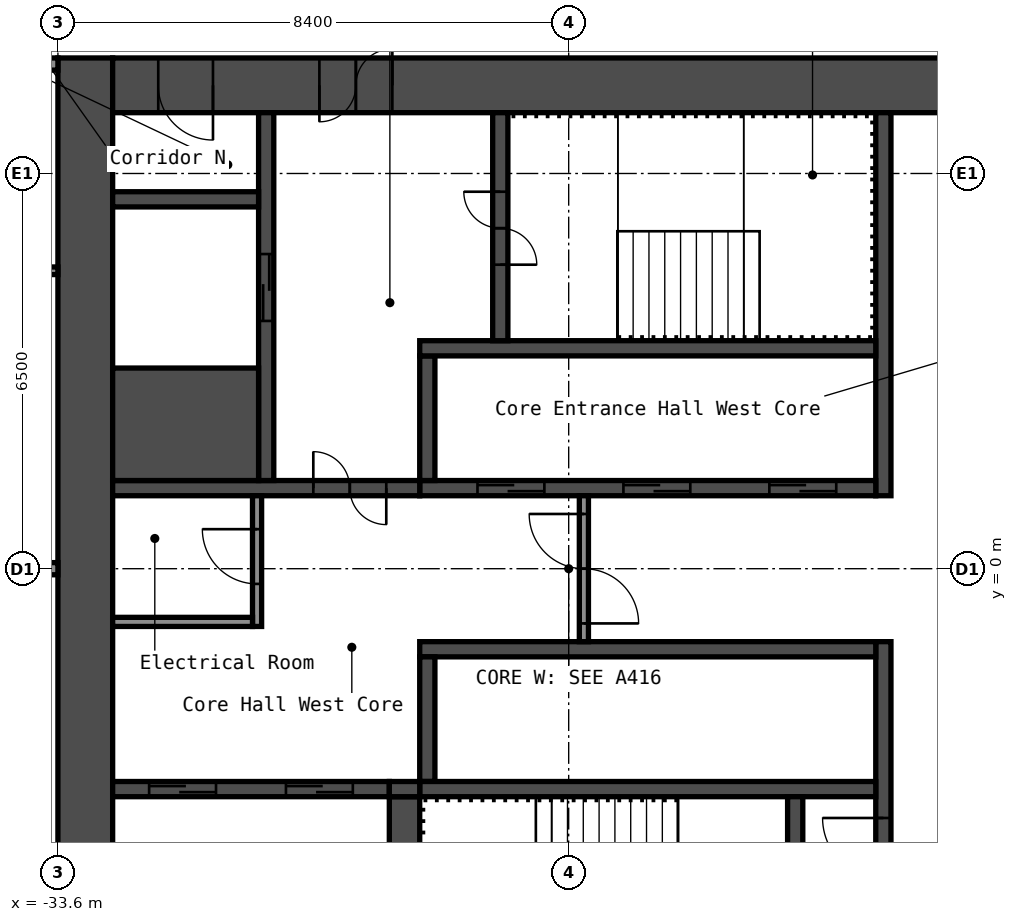
"""IFC4 building model, lengths in metres.
Left out: names, types, materials, properties, quantities, classifications, styles, units other than length and angle.
Written with IfcOpenShell. Run it as: python <this file> out.ifc"""

import sys

from ifc_helpers import new_model, si_unit, direction, frame, frame_2d, origin, place, context, subcontext, project, spatial, rectangle, extrude, element, fill, save


model = new_model("IFC4")
c1 = context("Model", 3, precision=1e-05, world=origin(), true_north=direction((0.0, 1.0)))
c2 = subcontext(c1, "Body", "Model", "MODEL_VIEW")
j1 = project(units=[si_unit("LENGTHUNIT", "METRE"), si_unit("PLANEANGLEUNIT", "RADIAN")], contexts=[c1])
p1 = place(None, origin())
s1 = spatial("IfcSite", under=j1, at=p1, CompositionType="ELEMENT")
p2 = place(p1, origin())
s2 = spatial("IfcBuilding", under=s1, at=p2, CompositionType="ELEMENT")
p3 = place(p2, frame((0.0, 0.0, 110.6)))
s3 = spatial("IfcBuildingStorey", under=s2, at=p3, CompositionType="ELEMENT", Elevation=110.6)
p4 = place(p3, frame((-33.15, -8.4, 0.0), z_axis=(0.0, 0.0, 1.0), x_axis=(0.0, 1.0, 0.0)))
e1 = element("IfcWall", 1, at=p4, inside=s3, PredefinedType="SHEAR", context=c2, shape_type="SweptSolid", body=[
    extrude(rectangle(XDim=16.8, YDim=0.9, at=frame_2d((8.4, 0.0))), origin(), (0.0, 0.0, 1.0), 2.8),
])
p5 = place(p3, frame((-32.7, 7.95, 0.0), z_axis=(0.0, 0.0, 1.0), x_axis=(1.0, 0.0, 0.0)))
e2 = element("IfcWall", 2, at=p5, inside=s3, PredefinedType="SHEAR", context=c2, shape_type="SweptSolid", body=[
    extrude(rectangle(XDim=15.0, YDim=0.9, at=frame_2d((7.5, 0.0))), origin(), (0.0, 0.0, 1.0), 2.8),
])
p6 = place(p5, frame((3.4, 0.0, 0.0)))
e3 = element("IfcOpeningElement", 3, at=p6, cuts=e2, PredefinedType="OPENING", context=c2, shape_type="SweptSolid", body=[
    extrude(rectangle(XDim=1.2, YDim=2.1, at=frame_2d((0.6, 1.05))), frame((0.0, 0.46, 0.0), z_axis=(0.0, -1.0, 0.0), x_axis=(1.0, 0.0, 0.0)), (0.0, 0.0, 1.0), 0.92),
])
p7 = place(p5, frame((0.75, 0.0, 0.0)))
e4 = element("IfcOpeningElement", 4, at=p7, cuts=e2, PredefinedType="OPENING", context=c2, shape_type="SweptSolid", body=[
    extrude(rectangle(XDim=0.9, YDim=2.1, at=frame_2d((0.45, 1.05))), frame((0.0, 0.46, 0.0), z_axis=(0.0, -1.0, 0.0), x_axis=(1.0, 0.0, 0.0)), (0.0, 0.0, 1.0), 0.92),
])
p8 = place(p3, frame((-20.025, 1.2, 0.0), z_axis=(0.0, 0.0, 1.0), x_axis=(0.0, 1.0, 0.0)))
e5 = element("IfcWall", 5, at=p8, inside=s3, PredefinedType="SHEAR", context=c2, shape_type="SweptSolid", body=[
    extrude(rectangle(XDim=6.3, YDim=0.25, at=frame_2d((3.15, 0.0))), origin(), (0.0, 0.0, 1.0), 2.8),
])
p9 = place(p3, frame((-20.025, -7.5, 0.0), z_axis=(0.0, 0.0, 1.0), x_axis=(0.0, 1.0, 0.0)))
e6 = element("IfcWall", 6, at=p9, inside=s3, PredefinedType="SHEAR", context=c2, shape_type="SweptSolid", body=[
    extrude(rectangle(XDim=6.3, YDim=0.25, at=frame_2d((3.15, 0.0))), origin(), (0.0, 0.0, 1.0), 2.8),
])
p10 = place(p9, frame((2.4, 0.0, 0.0)))
e7 = element("IfcOpeningElement", 7, at=p10, cuts=e6, PredefinedType="OPENING", context=c2, shape_type="SweptSolid", body=[
    extrude(rectangle(XDim=1.0, YDim=2.1, at=frame_2d((0.5, 1.05))), frame((0.0, 0.135, 0.0), z_axis=(0.0, -1.0, 0.0), x_axis=(1.0, 0.0, 0.0)), (0.0, 0.0, 1.0), 0.27),
])
p11 = place(p3, frame((-27.65, 1.325, 0.0), z_axis=(0.0, 0.0, 1.0), x_axis=(1.0, 0.0, 0.0)))
e8 = element("IfcWall", 8, at=p11, inside=s3, PredefinedType="SHEAR", context=c2, shape_type="SweptSolid", body=[
    extrude(rectangle(XDim=7.5, YDim=0.25, at=frame_2d((3.75, 0.0))), origin(), (0.0, 0.0, 1.0), 2.8),
])
p12 = place(p11, frame((5.75, 0.0, 0.0)))
e9 = element("IfcOpeningElement", 9, at=p12, cuts=e8, PredefinedType="OPENING", context=c2, shape_type="SweptSolid", body=[
    extrude(rectangle(XDim=1.1, YDim=2.1, at=frame_2d((0.55, 1.05))), frame((0.0, 0.135, 0.0), z_axis=(0.0, -1.0, 0.0), x_axis=(1.0, 0.0, 0.0)), (0.0, 0.0, 1.0), 0.27),
])
p13 = place(p11, frame((3.35, 0.0, 0.0)))
e10 = element("IfcOpeningElement", 10, at=p13, cuts=e8, PredefinedType="OPENING", context=c2, shape_type="SweptSolid", body=[
    extrude(rectangle(XDim=1.1, YDim=2.1, at=frame_2d((0.55, 1.05))), frame((0.0, 0.135, 0.0), z_axis=(0.0, -1.0, 0.0), x_axis=(1.0, 0.0, 0.0)), (0.0, 0.0, 1.0), 0.27),
])
p14 = place(p11, frame((0.95, 0.0, 0.0)))
e11 = element("IfcOpeningElement", 11, at=p14, cuts=e8, PredefinedType="OPENING", context=c2, shape_type="SweptSolid", body=[
    extrude(rectangle(XDim=1.1, YDim=2.1, at=frame_2d((0.55, 1.05))), frame((0.0, 0.135, 0.0), z_axis=(0.0, -1.0, 0.0), x_axis=(1.0, 0.0, 0.0)), (0.0, 0.0, 1.0), 0.27),
])
p15 = place(p3, frame((-27.525, 1.45, 0.0), z_axis=(0.0, 0.0, 1.0), x_axis=(0.0, 1.0, 0.0)))
e12 = element("IfcWall", 12, at=p15, inside=s3, PredefinedType="SHEAR", context=c2, shape_type="SweptSolid", body=[
    extrude(rectangle(XDim=2.05, YDim=0.25, at=frame_2d((1.025, 0.0))), origin(), (0.0, 0.0, 1.0), 2.8),
])
p16 = place(p3, frame((-27.65, 3.625, 0.0), z_axis=(0.0, 0.0, 1.0), x_axis=(1.0, 0.0, 0.0)))
e13 = element("IfcWall", 13, at=p16, inside=s3, PredefinedType="SHEAR", context=c2, shape_type="SweptSolid", body=[
    extrude(rectangle(XDim=7.5, YDim=0.25, at=frame_2d((3.75, 0.0))), origin(), (0.0, 0.0, 1.0), 2.8),
])
p17 = place(p3, frame((-26.325, 3.75, 0.0), z_axis=(0.0, 0.0, 1.0), x_axis=(0.0, 1.0, 0.0)))
e14 = element("IfcWall", 14, at=p17, inside=s3, PredefinedType="SHEAR", context=c2, shape_type="SweptSolid", body=[
    extrude(rectangle(XDim=3.75, YDim=0.25, at=frame_2d((1.875, 0.0))), origin(), (0.0, 0.0, 1.0), 2.8),
])
p18 = place(p17, frame((1.25, 0.0, 0.0)))
e15 = element("IfcOpeningElement", 15, at=p18, cuts=e14, PredefinedType="OPENING", context=c2, shape_type="SweptSolid", body=[
    extrude(rectangle(XDim=1.2, YDim=2.1, at=frame_2d((0.6, 1.05))), frame((0.0, 0.135, 0.0), z_axis=(0.0, -1.0, 0.0), x_axis=(1.0, 0.0, 0.0)), (0.0, 0.0, 1.0), 0.27),
])
p19 = place(p3, frame((-32.7, 1.325, 0.0), z_axis=(0.0, 0.0, 1.0), x_axis=(1.0, 0.0, 0.0)))
e16 = element("IfcWall", 16, at=p19, inside=s3, PredefinedType="SHEAR", context=c2, shape_type="SweptSolid", body=[
    extrude(rectangle(XDim=5.05, YDim=0.25, at=frame_2d((2.525, 0.0))), origin(), (0.0, 0.0, 1.0), 2.8),
])
p20 = place(p19, frame((3.3, 0.0, 0.0)))
e17 = element("IfcOpeningElement", 17, at=p20, cuts=e16, PredefinedType="OPENING", context=c2, shape_type="SweptSolid", body=[
    extrude(rectangle(XDim=1.2, YDim=2.1, at=frame_2d((0.6, 1.05))), frame((0.0, 0.135, 0.0), z_axis=(0.0, -1.0, 0.0), x_axis=(1.0, 0.0, 0.0)), (0.0, 0.0, 1.0), 0.27),
])
p21 = place(p3, frame((-30.175, 1.45, 0.0), z_axis=(0.0, 0.0, 1.0), x_axis=(0.0, 1.0, 0.0)))
e18 = element("IfcWall", 18, at=p21, inside=s3, PredefinedType="SHEAR", context=c2, shape_type="SweptSolid", body=[
    extrude(rectangle(XDim=6.05, YDim=0.25, at=frame_2d((3.025, 0.0))), origin(), (0.0, 0.0, 1.0), 2.8),
])
p22 = place(p21, frame((2.625, 0.0, 0.0)))
e19 = element("IfcOpeningElement", 19, at=p22, cuts=e18, PredefinedType="OPENING", context=c2, shape_type="SweptSolid", body=[
    extrude(rectangle(XDim=1.1, YDim=2.1, at=frame_2d((0.55, 1.05))), frame((0.0, 0.135, 0.0), z_axis=(0.0, -1.0, 0.0), x_axis=(1.0, 0.0, 0.0)), (0.0, 0.0, 1.0), 0.27),
])
p23 = place(p3, frame((-32.7, 2.375, 0.0), z_axis=(0.0, 0.0, 1.0), x_axis=(1.0, 0.0, 0.0)))
e20 = element("IfcWall", 20, at=p23, inside=s3, PredefinedType="SHEAR", context=c2, shape_type="SweptSolid", body=[
    extrude(rectangle(XDim=2.4, YDim=1.85, at=frame_2d((1.2, 0.0))), origin(), (0.0, 0.0, 1.0), 2.8),
])
p24 = place(p3, frame((-32.7, 6.075, 0.0), z_axis=(0.0, 0.0, 1.0), x_axis=(1.0, 0.0, 0.0)))
e21 = element("IfcWall", 21, at=p24, inside=s3, PredefinedType="SHEAR", context=c2, shape_type="SweptSolid", body=[
    extrude(rectangle(XDim=2.4, YDim=0.25, at=frame_2d((1.2, 0.0))), origin(), (0.0, 0.0, 1.0), 2.8),
])
p25 = place(p3, frame((-27.65, -1.325, 0.0), z_axis=(0.0, 0.0, 1.0), x_axis=(1.0, 0.0, 0.0)))
e22 = element("IfcWall", 22, at=p25, inside=s3, PredefinedType="SHEAR", context=c2, shape_type="SweptSolid", body=[
    extrude(rectangle(XDim=7.5, YDim=0.25, at=frame_2d((3.75, 0.0))), origin(), (0.0, 0.0, 1.0), 2.8),
])
p26 = place(p3, frame((-27.525, -3.5, 0.0), z_axis=(0.0, 0.0, 1.0), x_axis=(0.0, 1.0, 0.0)))
e23 = element("IfcWall", 23, at=p26, inside=s3, PredefinedType="SHEAR", context=c2, shape_type="SweptSolid", body=[
    extrude(rectangle(XDim=2.05, YDim=0.25, at=frame_2d((1.025, 0.0))), origin(), (0.0, 0.0, 1.0), 2.8),
])
p27 = place(p3, frame((-27.65, -3.625, 0.0), z_axis=(0.0, 0.0, 1.0), x_axis=(1.0, 0.0, 0.0)))
e24 = element("IfcWall", 24, at=p27, inside=s3, PredefinedType="SHEAR", context=c2, shape_type="SweptSolid", body=[
    extrude(rectangle(XDim=7.5, YDim=0.25, at=frame_2d((3.75, 0.0))), origin(), (0.0, 0.0, 1.0), 2.8),
])
p28 = place(p3, frame((-21.475, -7.5, 0.0), z_axis=(0.0, 0.0, 1.0), x_axis=(0.0, 1.0, 0.0)))
e25 = element("IfcWall", 25, at=p28, inside=s3, PredefinedType="SHEAR", context=c2, shape_type="SweptSolid", body=[
    extrude(rectangle(XDim=3.75, YDim=0.25, at=frame_2d((1.875, 0.0))), origin(), (0.0, 0.0, 1.0), 2.8),
])
p29 = place(p28, frame((1.3, 0.0, 0.0)))
e26 = element("IfcOpeningElement", 26, at=p29, cuts=e25, PredefinedType="OPENING", context=c2, shape_type="SweptSolid", body=[
    extrude(rectangle(XDim=1.2, YDim=2.1, at=frame_2d((0.6, 1.05))), frame((0.0, 0.135, 0.0), z_axis=(0.0, -1.0, 0.0), x_axis=(1.0, 0.0, 0.0)), (0.0, 0.0, 1.0), 0.27),
])
p30 = place(p3, frame((-27.9, -7.5, 0.0), z_axis=(0.0, 0.0, 1.0), x_axis=(0.0, 1.0, 0.0)))
e27 = element("IfcWall", 27, at=p30, inside=s3, PredefinedType="SHEAR", context=c2, shape_type="SweptSolid", body=[
    extrude(rectangle(XDim=3.75, YDim=0.5, at=frame_2d((1.875, 0.0))), origin(), (0.0, 0.0, 1.0), 2.8),
])
p31 = place(p3, frame((-32.7, -3.625, 0.0), z_axis=(0.0, 0.0, 1.0), x_axis=(1.0, 0.0, 0.0)))
e28 = element("IfcWall", 28, at=p31, inside=s3, PredefinedType="SHEAR", context=c2, shape_type="SweptSolid", body=[
    extrude(rectangle(XDim=4.55, YDim=0.25, at=frame_2d((2.275, 0.0))), origin(), (0.0, 0.0, 1.0), 2.8),
])
p32 = place(p31, frame((2.85, 0.0, 0.0)))
e29 = element("IfcOpeningElement", 29, at=p32, cuts=e28, PredefinedType="OPENING", context=c2, shape_type="SweptSolid", body=[
    extrude(rectangle(XDim=1.1, YDim=2.1, at=frame_2d((0.55, 1.05))), frame((0.0, 0.135, 0.0), z_axis=(0.0, -1.0, 0.0), x_axis=(1.0, 0.0, 0.0)), (0.0, 0.0, 1.0), 0.27),
])
p33 = place(p31, frame((0.6, 0.0, 0.0)))
e30 = element("IfcOpeningElement", 30, at=p33, cuts=e28, PredefinedType="OPENING", context=c2, shape_type="SweptSolid", body=[
    extrude(rectangle(XDim=1.1, YDim=2.1, at=frame_2d((0.55, 1.05))), frame((0.0, 0.135, 0.0), z_axis=(0.0, -1.0, 0.0), x_axis=(1.0, 0.0, 0.0)), (0.0, 0.0, 1.0), 0.27),
])
p34 = place(p3, frame((-28.15, -3.625, 0.0), z_axis=(0.0, 0.0, 1.0), x_axis=(1.0, 0.0, 0.0)))
e31 = element("IfcWall", 31, at=p34, inside=s3, PredefinedType="SHEAR", context=c2, shape_type="SweptSolid", body=[
    extrude(rectangle(XDim=0.5, YDim=0.25, at=frame_2d((0.25, 0.0))), origin(), (0.0, 0.0, 1.0), 2.8),
])
p35 = place(p3, frame((-24.95, -1.2, 0.0), z_axis=(0.0, 0.0, 1.0), x_axis=(0.0, 1.0, 0.0)))
e32 = element("IfcWall", 32, at=p35, inside=s3, PredefinedType="PARTITIONING", context=c2, shape_type="SweptSolid", body=[
    extrude(rectangle(XDim=2.4, YDim=0.15, at=frame_2d((1.2, 0.0))), origin(), (0.0, 0.0, 1.0), 2.8),
])
p36 = place(p35, frame((0.3, 0.0, 0.0)))
e33 = element("IfcOpeningElement", 33, at=p36, cuts=e32, PredefinedType="OPENING", context=c2, shape_type="SweptSolid", body=[
    extrude(rectangle(XDim=1.8, YDim=2.1, at=frame_2d((0.9, 1.05))), frame((0.0, 0.085, 0.0), z_axis=(0.0, -1.0, 0.0), x_axis=(1.0, 0.0, 0.0)), (0.0, 0.0, 1.0), 0.17),
])
p37 = place(p3, frame((-30.325, -0.95, 0.0), z_axis=(0.0, 0.0, 1.0), x_axis=(0.0, 1.0, 0.0)))
e34 = element("IfcWall", 34, at=p37, inside=s3, PredefinedType="PARTITIONING", context=c2, shape_type="SweptSolid", body=[
    extrude(rectangle(XDim=2.15, YDim=0.15, at=frame_2d((1.075, 0.0))), origin(), (0.0, 0.0, 1.0), 2.8),
])
p38 = place(p37, frame((0.7, 0.0, 0.0)))
e35 = element("IfcOpeningElement", 35, at=p38, cuts=e34, PredefinedType="OPENING", context=c2, shape_type="SweptSolid", body=[
    extrude(rectangle(XDim=0.9, YDim=2.1, at=frame_2d((0.45, 1.05))), frame((0.0, 0.085, 0.0), z_axis=(0.0, -1.0, 0.0), x_axis=(1.0, 0.0, 0.0)), (0.0, 0.0, 1.0), 0.17),
])
p39 = place(p3, frame((-32.7, -0.875, 0.0), z_axis=(0.0, 0.0, 1.0), x_axis=(1.0, 0.0, 0.0)))
e36 = element("IfcWall", 36, at=p39, inside=s3, PredefinedType="PARTITIONING", context=c2, shape_type="SweptSolid", body=[
    extrude(rectangle(XDim=2.3, YDim=0.15, at=frame_2d((1.15, 0.0))), origin(), (0.0, 0.0, 1.0), 2.8),
])
p40 = place(p3, frame((-43.9, 0.0, 0.0), z_axis=(0.0, 0.0, 1.0), x_axis=(1.0, 0.0, 0.0)))
e37 = element("IfcWall", 37, at=p40, inside=s3, PredefinedType="PARTITIONING", context=c2, shape_type="SweptSolid", body=[
    extrude(rectangle(XDim=10.3, YDim=0.2, at=frame_2d((5.15, 0.0))), origin(), (0.0, 0.0, 1.0), 2.8),
])
p41 = place(p3, frame((-36.938, 4.9, 0.0), z_axis=(0.0, 0.0, 1.0), x_axis=(1.0, 0.0, 0.0)))
e38 = element("IfcWall", 38, at=p41, inside=s3, PredefinedType="PARTITIONING", context=c2, shape_type="SweptSolid", body=[
    extrude(rectangle(XDim=3.337, YDim=0.125, at=frame_2d((1.669, 0.0))), origin(), (0.0, 0.0, 1.0), 2.8),
])
p42 = place(p41, frame((1.238, 0.0, 0.0)))
e39 = element("IfcOpeningElement", 39, at=p42, cuts=e38, PredefinedType="OPENING", context=c2, shape_type="SweptSolid", body=[
    extrude(rectangle(XDim=0.8, YDim=2.1, at=frame_2d((0.4, 1.05))), frame((0.0, 0.073, 0.0), z_axis=(0.0, -1.0, 0.0), x_axis=(1.0, 0.0, 0.0)), (0.0, 0.0, 1.0), 0.145),
])
p43 = place(p3, frame((-44.0, 8.3, 0.0), z_axis=(0.0, 0.0, 1.0), x_axis=(1.0, 0.0, 0.0)))
e40 = element("IfcWall", 40, at=p43, inside=s3, PredefinedType="PARTITIONING", context=c2, shape_type="SweptSolid", body=[
    extrude(rectangle(XDim=10.4, YDim=0.2, at=frame_2d((5.2, 0.0))), origin(), (0.0, 0.0, 1.0), 2.8),
])
p44 = place(p43, frame((3.05, 0.0, 0.0)))
e41 = element("IfcOpeningElement", 41, at=p44, cuts=e40, PredefinedType="OPENING", context=c2, shape_type="SweptSolid", body=[
    extrude(rectangle(XDim=1.0, YDim=2.1, at=frame_2d((0.5, 1.05))), frame((0.0, 0.11, 0.0), z_axis=(0.0, -1.0, 0.0), x_axis=(1.0, 0.0, 0.0)), (0.0, 0.0, 1.0), 0.22),
])
p45 = place(p6, origin())
e42 = element("IfcDoor", 42, at=p45, inside=s3, OperationType="DOUBLE_DOOR_SINGLE_SWING", PredefinedType="DOOR", context=c2, shape_type="SweptSolid", body=[
    extrude(rectangle(XDim=1.2, YDim=2.1, at=frame_2d((0.6, 1.05))), frame((0.0, 0.025, 0.0), z_axis=(0.0, -1.0, 0.0), x_axis=(1.0, 0.0, 0.0)), (0.0, 0.0, 1.0), 0.05),
])
fill(e3, e42)
p46 = place(p7, origin())
e43 = element("IfcDoor", 43, at=p46, inside=s3, OperationType="SINGLE_SWING_RIGHT", PredefinedType="DOOR", context=c2, shape_type="SweptSolid", body=[
    extrude(rectangle(XDim=0.9, YDim=2.1, at=frame_2d((0.45, 1.05))), frame((0.0, 0.025, 0.0), z_axis=(0.0, -1.0, 0.0), x_axis=(1.0, 0.0, 0.0)), (0.0, 0.0, 1.0), 0.05),
])
fill(e4, e43)
p47 = place(p18, origin())
e44 = element("IfcDoor", 44, at=p47, inside=s3, OperationType="DOUBLE_DOOR_SINGLE_SWING", PredefinedType="DOOR", context=c2, shape_type="SweptSolid", body=[
    extrude(rectangle(XDim=1.2, YDim=2.1, at=frame_2d((0.6, 1.05))), frame((0.0, 0.025, 0.0), z_axis=(0.0, -1.0, 0.0), x_axis=(1.0, 0.0, 0.0)), (0.0, 0.0, 1.0), 0.05),
])
fill(e15, e44)
p48 = place(p10, origin())
e45 = element("IfcDoor", 45, at=p48, inside=s3, OperationType="SINGLE_SWING_LEFT", PredefinedType="DOOR", context=c2, shape_type="SweptSolid", body=[
    extrude(rectangle(XDim=1.0, YDim=2.1, at=frame_2d((0.5, 1.05))), frame((0.0, 0.025, 0.0), z_axis=(0.0, -1.0, 0.0), x_axis=(1.0, 0.0, 0.0)), (0.0, 0.0, 1.0), 0.05),
])
fill(e7, e45)
p49 = place(p20, origin())
e46 = element("IfcDoor", 46, at=p49, inside=s3, OperationType="DOUBLE_DOOR_SINGLE_SWING", PredefinedType="DOOR", context=c2, shape_type="SweptSolid", body=[
    extrude(rectangle(XDim=1.2, YDim=2.1, at=frame_2d((0.6, 1.05))), frame((0.0, 0.025, 0.0), z_axis=(0.0, -1.0, 0.0), x_axis=(1.0, 0.0, 0.0)), (0.0, 0.0, 1.0), 0.05),
])
fill(e17, e46)
p50 = place(p36, origin())
e47 = element("IfcDoor", 47, at=p50, inside=s3, OperationType="DOUBLE_DOOR_SINGLE_SWING", PredefinedType="DOOR", context=c2, shape_type="SweptSolid", body=[
    extrude(rectangle(XDim=1.8, YDim=2.1, at=frame_2d((0.9, 1.05))), frame((0.0, 0.025, 0.0), z_axis=(0.0, -1.0, 0.0), x_axis=(1.0, 0.0, 0.0)), (0.0, 0.0, 1.0), 0.05),
])
fill(e33, e47)
p51 = place(p38, origin())
e48 = element("IfcDoor", 48, at=p51, inside=s3, OperationType="SINGLE_SWING_LEFT", PredefinedType="DOOR", context=c2, shape_type="SweptSolid", body=[
    extrude(rectangle(XDim=0.9, YDim=2.1, at=frame_2d((0.45, 1.05))), frame((0.0, 0.025, 0.0), z_axis=(0.0, -1.0, 0.0), x_axis=(1.0, 0.0, 0.0)), (0.0, 0.0, 1.0), 0.05),
])
fill(e35, e48)
p52 = place(p12, origin())
e49 = element("IfcDoor", 49, at=p52, inside=s3, OperationType="DOUBLE_DOOR_SLIDING", PredefinedType="DOOR", context=c2, shape_type="SweptSolid", body=[
    extrude(rectangle(XDim=1.1, YDim=2.1, at=frame_2d((0.55, 1.05))), frame((0.0, 0.025, 0.0), z_axis=(0.0, -1.0, 0.0), x_axis=(1.0, 0.0, 0.0)), (0.0, 0.0, 1.0), 0.05),
])
fill(e9, e49)
p53 = place(p13, origin())
e50 = element("IfcDoor", 50, at=p53, inside=s3, OperationType="DOUBLE_DOOR_SLIDING", PredefinedType="DOOR", context=c2, shape_type="SweptSolid", body=[
    extrude(rectangle(XDim=1.1, YDim=2.1, at=frame_2d((0.55, 1.05))), frame((0.0, 0.025, 0.0), z_axis=(0.0, -1.0, 0.0), x_axis=(1.0, 0.0, 0.0)), (0.0, 0.0, 1.0), 0.05),
])
fill(e10, e50)
p54 = place(p14, origin())
e51 = element("IfcDoor", 51, at=p54, inside=s3, OperationType="DOUBLE_DOOR_SLIDING", PredefinedType="DOOR", context=c2, shape_type="SweptSolid", body=[
    extrude(rectangle(XDim=1.1, YDim=2.1, at=frame_2d((0.55, 1.05))), frame((0.0, 0.025, 0.0), z_axis=(0.0, -1.0, 0.0), x_axis=(1.0, 0.0, 0.0)), (0.0, 0.0, 1.0), 0.05),
])
fill(e11, e51)
p55 = place(p22, origin())
e52 = element("IfcDoor", 52, at=p55, inside=s3, OperationType="DOUBLE_DOOR_SLIDING", PredefinedType="DOOR", context=c2, shape_type="SweptSolid", body=[
    extrude(rectangle(XDim=1.1, YDim=2.1, at=frame_2d((0.55, 1.05))), frame((0.0, 0.025, 0.0), z_axis=(0.0, -1.0, 0.0), x_axis=(1.0, 0.0, 0.0)), (0.0, 0.0, 1.0), 0.05),
])
fill(e19, e52)
p56 = place(p32, origin())
e53 = element("IfcDoor", 53, at=p56, inside=s3, OperationType="DOUBLE_DOOR_SLIDING", PredefinedType="DOOR", context=c2, shape_type="SweptSolid", body=[
    extrude(rectangle(XDim=1.1, YDim=2.1, at=frame_2d((0.55, 1.05))), frame((0.0, 0.025, 0.0), z_axis=(0.0, -1.0, 0.0), x_axis=(1.0, 0.0, 0.0)), (0.0, 0.0, 1.0), 0.05),
])
fill(e29, e53)
p57 = place(p33, origin())
e54 = element("IfcDoor", 54, at=p57, inside=s3, OperationType="DOUBLE_DOOR_SLIDING", PredefinedType="DOOR", context=c2, shape_type="SweptSolid", body=[
    extrude(rectangle(XDim=1.1, YDim=2.1, at=frame_2d((0.55, 1.05))), frame((0.0, 0.025, 0.0), z_axis=(0.0, -1.0, 0.0), x_axis=(1.0, 0.0, 0.0)), (0.0, 0.0, 1.0), 0.05),
])
fill(e30, e54)
save(model, sys.argv[1])
